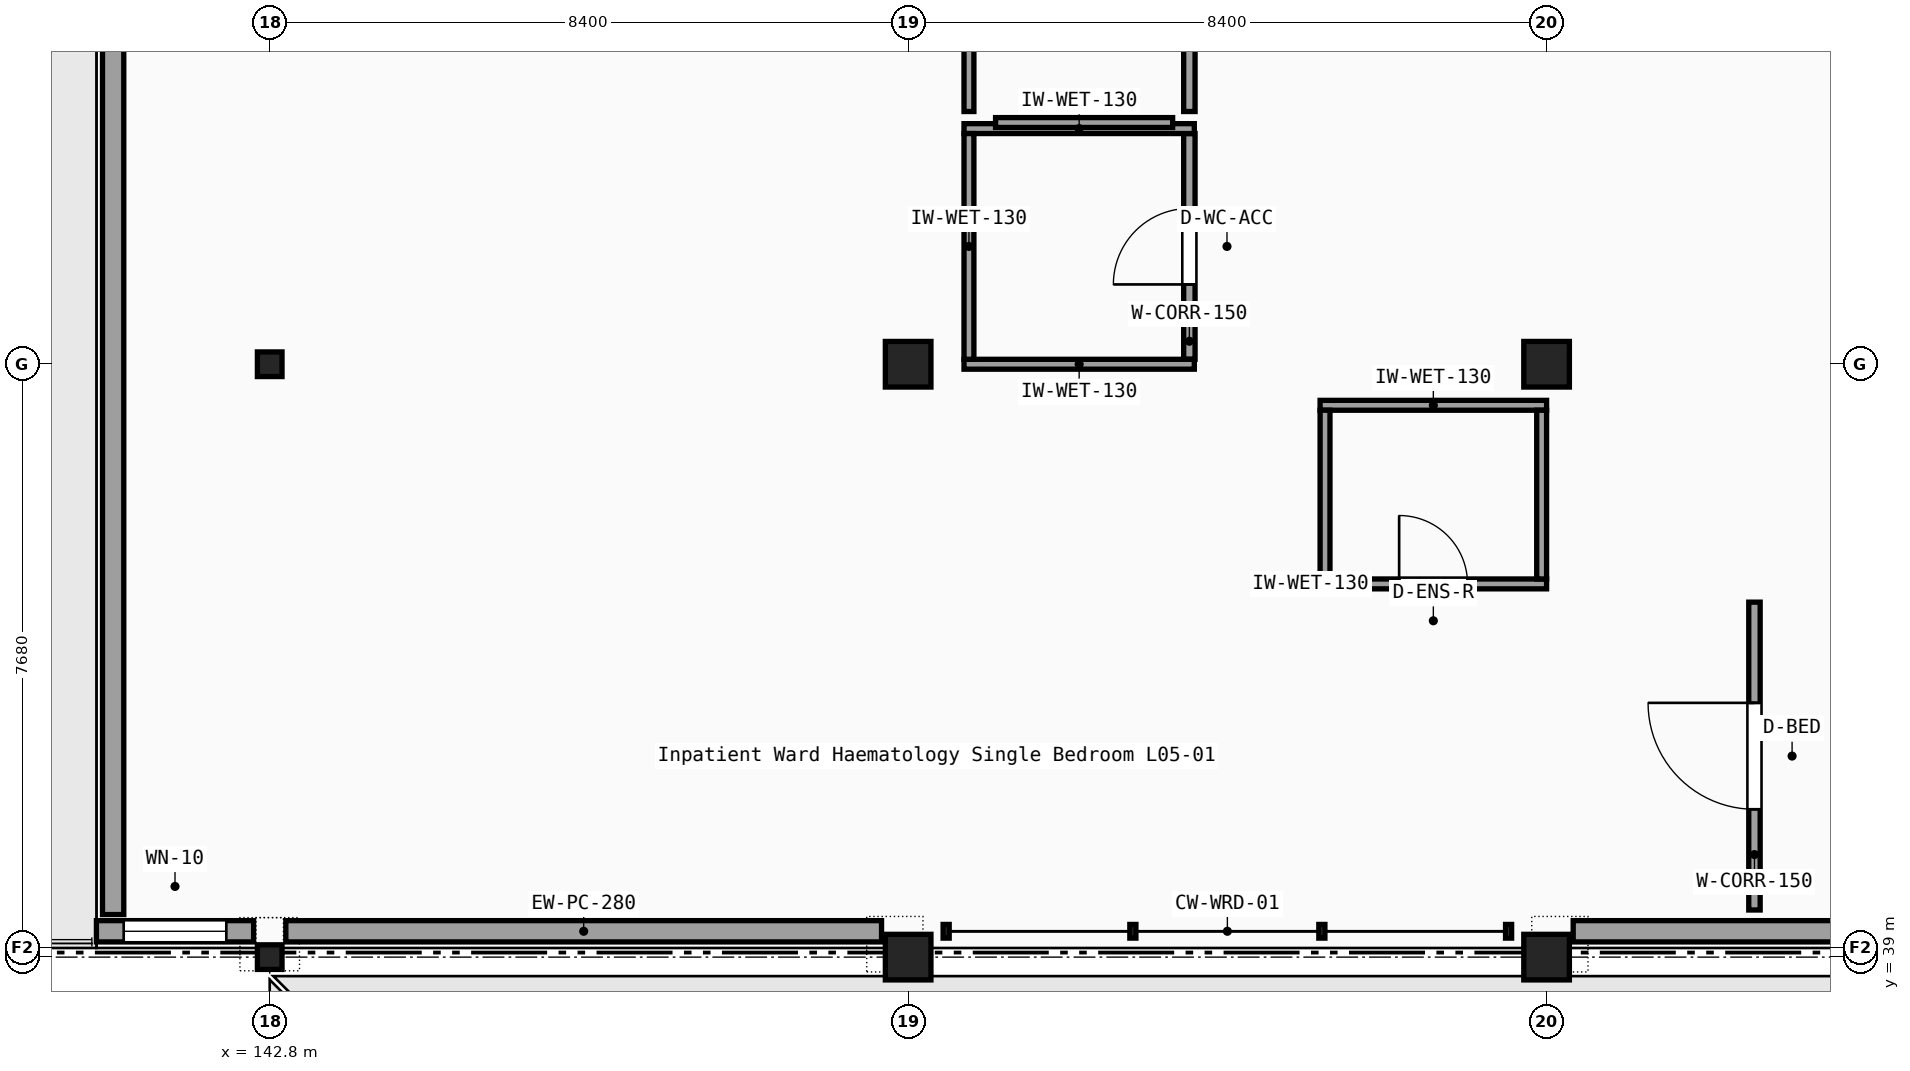
"""IFC4 building model, lengths in metres.
Left out: names, types, materials, properties, quantities, classifications, styles, units other than length and angle.
Written with IfcOpenShell. Run it as: python <this file> out.ifc"""

import sys

from ifc_helpers import new_model, si_unit, direction, frame, frame_2d, origin, origin_2d, place, context, subcontext, project, spatial, rectangle, hollow_circle, extrude, element, fill, save


model = new_model("IFC4")
c1 = context("Model", 3, precision=1e-05, world=origin(), true_north=direction((0.0, 1.0)))
c2 = subcontext(c1, "Body", "Model", "MODEL_VIEW")
j1 = project(units=[si_unit("LENGTHUNIT", "METRE"), si_unit("PLANEANGLEUNIT", "RADIAN")], contexts=[c1])
p1 = place(None, origin())
s1 = spatial("IfcSite", under=j1, at=p1, CompositionType="ELEMENT")
p2 = place(p1, origin())
s2 = spatial("IfcBuilding", under=s1, at=p2, CompositionType="ELEMENT")
p3 = place(p2, frame((0.0, 0.0, 22.95)))
s3 = spatial("IfcBuildingStorey", under=s2, at=p3, CompositionType="ELEMENT", Elevation=22.95)
for number, where, z_axis, x_axis in (
    (1, (142.8, 39.0, 0.0), (0.0, 0.0, 1.0), (1.0, 0.0, 0.0)),
    (2, (142.8, 46.8, 0.0), (0.0, 0.0, 1.0), (1.0, 0.0, 0.0)),
):
    element("IfcColumn", number, at=place(p3, frame(where, z_axis=z_axis, x_axis=x_axis)), inside=s3, PredefinedType="COLUMN", context=c2, shape_type="SweptSolid", body=[
        extrude(hollow_circle(Radius=0.162, WallThickness=0.016, at=origin_2d()), origin(), (0.0, 0.0, 1.0), 3.84),
    ])
for number, where, z_axis, x_axis in (
    (3, (151.2, 39.0, 0.0), (0.0, 0.0, 1.0), (1.0, 0.0, 0.0)),
    (4, (151.2, 46.8, 0.0), (0.0, 0.0, 1.0), (1.0, 0.0, 0.0)),
    (5, (159.6, 39.0, 0.0), (0.0, 0.0, 1.0), (1.0, 0.0, 0.0)),
    (6, (159.6, 46.8, 0.0), (0.0, 0.0, 1.0), (1.0, 0.0, 0.0)),
):
    element("IfcColumn", number, at=place(p3, frame(where, z_axis=z_axis, x_axis=x_axis)), inside=s3, PredefinedType="COLUMN", context=c2, shape_type="SweptSolid", body=[
        extrude(rectangle(XDim=0.6, YDim=0.6, at=origin_2d()), origin(), (0.0, 0.0, 1.0), 4.05),
    ])
p4 = place(p3, frame((140.74, 39.56, 0.0), z_axis=(0.0, 0.0, 1.0), x_axis=(0.0, 1.0, 0.0)))
e7 = element("IfcWall", 7, at=p4, inside=s3, PredefinedType="SOLIDWALL", context=c2, shape_type="SweptSolid", body=[
    extrude(rectangle(XDim=80.0, YDim=0.28, at=frame_2d((40.0, 0.0))), origin(), (0.0, 0.0, 1.0), 3.77),
])
p5 = place(p4, frame((22.15, 0.0, 0.0)))
e8 = element("IfcOpeningElement", 8, at=p5, cuts=e7, PredefinedType="OPENING", context=c2, shape_type="SweptSolid", body=[
    extrude(rectangle(XDim=1.5, YDim=2.2, at=frame_2d((0.75, 1.1))), frame((0.0, 0.15, 0.0), z_axis=(0.0, -1.0, 0.0), x_axis=(1.0, 0.0, 0.0)), (0.0, 0.0, 1.0), 0.3),
])
p6 = place(p4, frame((65.0, 0.0, 0.0)))
e9 = element("IfcOpeningElement", 9, at=p6, cuts=e7, PredefinedType="OPENING", context=c2, shape_type="SweptSolid", body=[
    extrude(rectangle(XDim=1.2, YDim=2.2, at=frame_2d((0.6, 1.1))), frame((0.0, 0.15, 0.0), z_axis=(0.0, -1.0, 0.0), x_axis=(1.0, 0.0, 0.0)), (0.0, 0.0, 1.0), 0.3),
])
p7 = place(p3, frame((140.52, 39.34, 0.0), z_axis=(0.0, 0.0, 1.0), x_axis=(1.0, 0.0, 0.0)))
e10 = element("IfcWall", 10, at=p7, inside=s3, PredefinedType="SOLIDWALL", context=c2, shape_type="SweptSolid", body=[
    extrude(rectangle(XDim=2.068, YDim=0.28, at=frame_2d((1.034, 0.0))), origin(), (0.0, 0.0, 1.0), 3.52),
])
p8 = place(p7, frame((0.359, 0.0, 1.0)))
e11 = element("IfcOpeningElement", 11, at=p8, cuts=e10, PredefinedType="OPENING", context=c2, shape_type="SweptSolid", body=[
    extrude(rectangle(XDim=1.35, YDim=1.45, at=frame_2d((0.675, 0.725))), frame((0.0, 0.15, 0.0), z_axis=(0.0, -1.0, 0.0), x_axis=(1.0, 0.0, 0.0)), (0.0, 0.0, 1.0), 0.3),
])
p9 = place(p3, frame((143.012, 39.34, 0.0), z_axis=(0.0, 0.0, 1.0), x_axis=(1.0, 0.0, 0.0)))
e12 = element("IfcWall", 12, at=p9, inside=s3, PredefinedType="SOLIDWALL", context=c2, shape_type="SweptSolid", body=[
    extrude(rectangle(XDim=7.838, YDim=0.28, at=frame_2d((3.919, 0.0))), origin(), (0.0, 0.0, 1.0), 3.51),
])
p10 = place(p3, frame((159.95, 39.34, 0.0), z_axis=(0.0, 0.0, 1.0), x_axis=(1.0, 0.0, 0.0)))
e13 = element("IfcWall", 13, at=p10, inside=s3, PredefinedType="SOLIDWALL", context=c2, shape_type="SweptSolid", body=[
    extrude(rectangle(XDim=7.85, YDim=0.28, at=frame_2d((3.925, 0.0))), origin(), (0.0, 0.0, 1.0), 3.51),
])
p11 = place(p3, frame((154.9, 46.865, 0.0), z_axis=(0.0, 0.0, 1.0), x_axis=(0.0, 1.0, 0.0)))
e14 = element("IfcWall", 14, at=p11, inside=s3, PredefinedType="PARTITIONING", context=c2, shape_type="SweptSolid", body=[
    extrude(rectangle(XDim=2.97, YDim=0.15, at=frame_2d((1.485, 0.0))), origin(), (0.0, 0.0, 1.0), 3.25),
])
p12 = place(p11, frame((0.985, 0.0, 0.0)))
e15 = element("IfcOpeningElement", 15, at=p12, cuts=e14, PredefinedType="OPENING", context=c2, shape_type="SweptSolid", body=[
    extrude(rectangle(XDim=1.0, YDim=2.15, at=frame_2d((0.5, 1.075))), frame((0.0, 0.085, 0.0), z_axis=(0.0, -1.0, 0.0), x_axis=(1.0, 0.0, 0.0)), (0.0, 0.0, 1.0), 0.17),
])
p13 = place(p3, frame((151.935, 46.8, 0.0), z_axis=(0.0, 0.0, 1.0), x_axis=(1.0, 0.0, 0.0)))
e16 = element("IfcWall", 16, at=p13, inside=s3, PredefinedType="PARTITIONING", context=c2, shape_type="SweptSolid", body=[
    extrude(rectangle(XDim=3.03, YDim=0.13, at=frame_2d((1.515, 0.0))), origin(), (0.0, 0.0, 1.0), 3.25),
])
p14 = place(p3, frame((151.935, 49.9, 0.0), z_axis=(0.0, 0.0, 1.0), x_axis=(1.0, 0.0, 0.0)))
e17 = element("IfcWall", 17, at=p14, inside=s3, PredefinedType="PARTITIONING", context=c2, shape_type="SweptSolid", body=[
    extrude(rectangle(XDim=3.03, YDim=0.13, at=frame_2d((1.515, 0.0))), origin(), (0.0, 0.0, 1.0), 3.77),
])
p15 = place(p3, frame((152.0, 46.865, 0.0), z_axis=(0.0, 0.0, 1.0), x_axis=(0.0, 1.0, 0.0)))
e18 = element("IfcWall", 18, at=p15, inside=s3, PredefinedType="PARTITIONING", context=c2, shape_type="SweptSolid", body=[
    extrude(rectangle(XDim=2.97, YDim=0.13, at=frame_2d((1.485, 0.0))), origin(), (0.0, 0.0, 1.0), 3.25),
])
p16 = place(p3, frame((152.35, 49.98, 0.0), z_axis=(0.0, 0.0, 1.0), x_axis=(1.0, 0.0, 0.0)))
e19 = element("IfcWall", 19, at=p16, inside=s3, PredefinedType="PARTITIONING", context=c2, shape_type="SweptSolid", body=[
    extrude(rectangle(XDim=2.33, YDim=0.13, at=frame_2d((1.165, 0.0))), origin(), (0.0, 0.0, 1.0), 3.77),
])
p17 = place(p3, frame((154.9, 50.125, 0.0), z_axis=(0.0, 0.0, 1.0), x_axis=(0.0, 1.0, 0.0)))
e20 = element("IfcWall", 20, at=p17, inside=s3, PredefinedType="PARTITIONING", context=c2, shape_type="SweptSolid", body=[
    extrude(rectangle(XDim=3.31, YDim=0.15, at=frame_2d((1.655, 0.0))), origin(), (0.0, 0.0, 1.0), 3.77),
])
p18 = place(p17, frame((1.195, 0.0, 0.0)))
e21 = element("IfcOpeningElement", 21, at=p18, cuts=e20, PredefinedType="OPENING", context=c2, shape_type="SweptSolid", body=[
    extrude(rectangle(XDim=0.92, YDim=2.15, at=frame_2d((0.46, 1.075))), frame((0.0, 0.085, 0.0), z_axis=(0.0, -1.0, 0.0), x_axis=(1.0, 0.0, 0.0)), (0.0, 0.0, 1.0), 0.17),
])
p19 = place(p3, frame((152.0, 50.125, 0.0), z_axis=(0.0, 0.0, 1.0), x_axis=(0.0, 1.0, 0.0)))
e22 = element("IfcWall", 22, at=p19, inside=s3, PredefinedType="PARTITIONING", context=c2, shape_type="SweptSolid", body=[
    extrude(rectangle(XDim=3.31, YDim=0.13, at=frame_2d((1.655, 0.0))), origin(), (0.0, 0.0, 1.0), 3.77),
])
p20 = place(p3, frame((162.335, 39.62, 0.0), z_axis=(0.0, 0.0, 1.0), x_axis=(0.0, 1.0, 0.0)))
e23 = element("IfcWall", 23, at=p20, inside=s3, PredefinedType="PARTITIONING", context=c2, shape_type="SweptSolid", body=[
    extrude(rectangle(XDim=4.05, YDim=0.15, at=frame_2d((2.025, 0.0))), origin(), (0.0, 0.0, 1.0), 3.77),
])
p21 = place(p20, frame((1.325, 0.0, 0.0)))
e24 = element("IfcOpeningElement", 24, at=p21, cuts=e23, PredefinedType="OPENING", context=c2, shape_type="SweptSolid", body=[
    extrude(rectangle(XDim=1.4, YDim=2.2, at=frame_2d((0.7, 1.1))), frame((0.0, 0.085, 0.0), z_axis=(0.0, -1.0, 0.0), x_axis=(1.0, 0.0, 0.0)), (0.0, 0.0, 1.0), 0.17),
])
p22 = place(p3, frame((156.62, 43.91, 0.0), z_axis=(0.0, 0.0, 1.0), x_axis=(1.0, 0.0, 0.0)))
e25 = element("IfcWall", 25, at=p22, inside=s3, PredefinedType="PARTITIONING", context=c2, shape_type="SweptSolid", body=[
    extrude(rectangle(XDim=2.98, YDim=0.13, at=frame_2d((1.49, 0.0))), origin(), (0.0, 0.0, 1.0), 3.51),
])
p23 = place(p22, frame((1.04, 0.0, 0.0)))
e26 = element("IfcOpeningElement", 26, at=p23, cuts=e25, PredefinedType="OPENING", context=c2, shape_type="SweptSolid", body=[
    extrude(rectangle(XDim=0.9, YDim=2.1, at=frame_2d((0.45, 1.05))), frame((0.0, 0.075, 0.0), z_axis=(0.0, -1.0, 0.0), x_axis=(1.0, 0.0, 0.0)), (0.0, 0.0, 1.0), 0.15),
])
p24 = place(p3, frame((156.62, 46.26, 0.0), z_axis=(0.0, 0.0, 1.0), x_axis=(1.0, 0.0, 0.0)))
e27 = element("IfcWall", 27, at=p24, inside=s3, PredefinedType="PARTITIONING", context=c2, shape_type="SweptSolid", body=[
    extrude(rectangle(XDim=2.98, YDim=0.13, at=frame_2d((1.49, 0.0))), origin(), (0.0, 0.0, 1.0), 3.51),
])
p25 = place(p3, frame((156.685, 43.975, 0.0), z_axis=(0.0, 0.0, 1.0), x_axis=(0.0, 1.0, 0.0)))
e28 = element("IfcWall", 28, at=p25, inside=s3, PredefinedType="PARTITIONING", context=c2, shape_type="SweptSolid", body=[
    extrude(rectangle(XDim=2.22, YDim=0.13, at=frame_2d((1.11, 0.0))), origin(), (0.0, 0.0, 1.0), 3.77),
])
p26 = place(p3, frame((159.535, 43.975, 0.0), z_axis=(0.0, 0.0, 1.0), x_axis=(0.0, 1.0, 0.0)))
e29 = element("IfcWall", 29, at=p26, inside=s3, PredefinedType="PARTITIONING", context=c2, shape_type="SweptSolid", body=[
    extrude(rectangle(XDim=2.22, YDim=0.13, at=frame_2d((1.11, 0.0))), origin(), (0.0, 0.0, 1.0), 3.51),
])
p27 = place(p8, origin())
e30 = element("IfcWindow", 30, at=p27, inside=s3, PartitioningType="SINGLE_PANEL", PredefinedType="WINDOW", context=c2, shape_type="SweptSolid", body=[
    extrude(rectangle(XDim=1.35, YDim=1.45, at=frame_2d((0.675, 0.725))), frame((0.0, 0.03, 0.0), z_axis=(0.0, -1.0, 0.0), x_axis=(1.0, 0.0, 0.0)), (0.0, 0.0, 1.0), 0.06),
])
fill(e11, e30)
p28 = place(p12, origin())
e31 = element("IfcDoor", 31, at=p28, inside=s3, OperationType="SINGLE_SWING_LEFT", PredefinedType="DOOR", context=c2, shape_type="SweptSolid", body=[
    extrude(rectangle(XDim=1.0, YDim=2.15, at=frame_2d((0.5, 1.075))), frame((0.0, 0.025, 0.0), z_axis=(0.0, -1.0, 0.0), x_axis=(1.0, 0.0, 0.0)), (0.0, 0.0, 1.0), 0.05),
])
fill(e15, e31)
p29 = place(p21, origin())
e32 = element("IfcDoor", 32, at=p29, inside=s3, OperationType="SINGLE_SWING_RIGHT", PredefinedType="DOOR", context=c2, shape_type="SweptSolid", body=[
    extrude(rectangle(XDim=1.4, YDim=2.2, at=frame_2d((0.7, 1.1))), frame((0.0, 0.025, 0.0), z_axis=(0.0, -1.0, 0.0), x_axis=(1.0, 0.0, 0.0)), (0.0, 0.0, 1.0), 0.05),
])
fill(e24, e32)
p30 = place(p23, origin())
e33 = element("IfcDoor", 33, at=p30, inside=s3, OperationType="SINGLE_SWING_LEFT", PredefinedType="DOOR", context=c2, shape_type="SweptSolid", body=[
    extrude(rectangle(XDim=0.9, YDim=2.1, at=frame_2d((0.45, 1.05))), frame((0.0, 0.025, 0.0), z_axis=(0.0, -1.0, 0.0), x_axis=(1.0, 0.0, 0.0)), (0.0, 0.0, 1.0), 0.05),
])
fill(e26, e33)
save(model, sys.argv[1])
